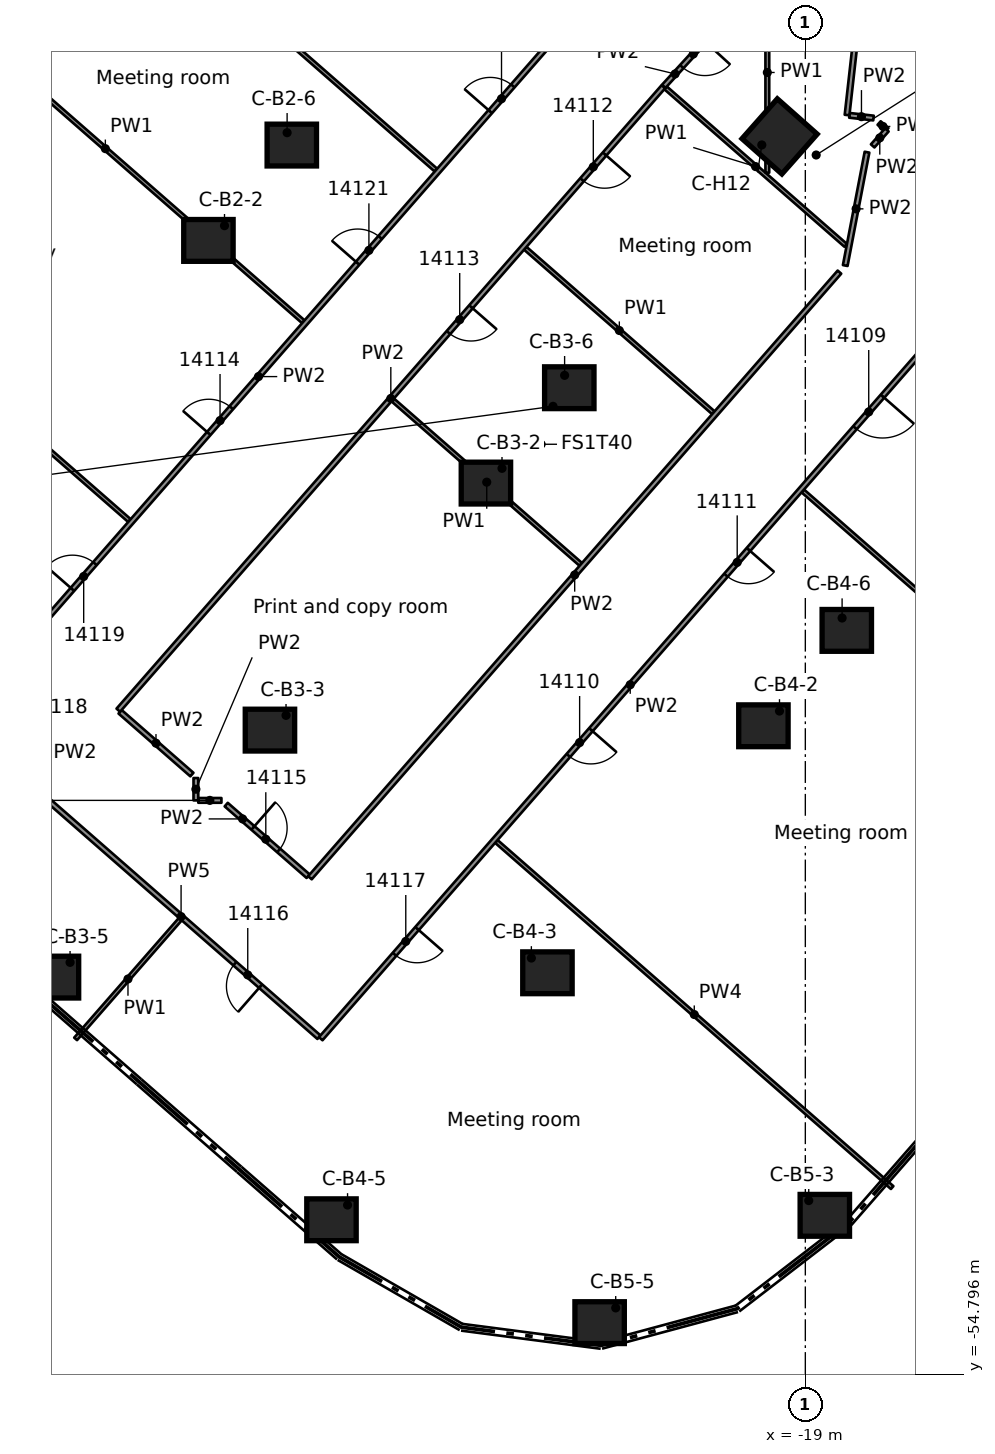
"""IFC4 building model, lengths in metres.
Left out: names, types, materials, properties, quantities, classifications, styles, units other than length and angle.
Written with IfcOpenShell. Run it as: python <this file> out.ifc"""

import sys

from ifc_helpers import new_model, si_unit, direction, frame, frame_2d, origin, origin_2d, place, context, subcontext, project, spatial, rectangle, extrude, element, fill, save


model = new_model("IFC4")
c1 = context("Model", 3, precision=1e-05, world=origin(), true_north=direction((0.0, 1.0)))
c2 = subcontext(c1, "Body", "Model", "MODEL_VIEW")
j1 = project(units=[si_unit("LENGTHUNIT", "METRE"), si_unit("PLANEANGLEUNIT", "RADIAN")], contexts=[c1])
p1 = place(None, origin())
s1 = spatial("IfcSite", under=j1, at=p1, CompositionType="ELEMENT")
p2 = place(p1, origin())
s2 = spatial("IfcBuilding", under=s1, at=p2, CompositionType="ELEMENT")
p3 = place(p2, frame((0.0, 0.0, 69.3)))
s3 = spatial("IfcBuildingStorey", under=s2, at=p3, CompositionType="ELEMENT", Elevation=69.3)
for number, where, z_axis, x_axis in (
    (1, (-34.707, -24.956, 0.0), (0.0, 0.0, 1.0), (1.0, 0.0, 0.0)),
    (2, (-32.513, -22.447, 0.0), (0.0, 0.0, 1.0), (1.0, 0.0, 0.0)),
    (3, (-27.405, -31.341, 0.0), (0.0, 0.0, 1.0), (1.0, 0.0, 0.0)),
    (4, (-33.088, -37.841, 0.0), (0.0, 0.0, 1.0), (1.0, 0.0, 0.0)),
    (5, (-38.771, -44.34, 0.0), (0.0, 0.0, 1.0), (1.0, 0.0, 0.0)),
    (6, (-25.211, -28.832, 0.0), (0.0, 0.0, 1.0), (1.0, 0.0, 0.0)),
    (7, (-20.103, -37.727, 0.0), (0.0, 0.0, 1.0), (1.0, 0.0, 0.0)),
    (8, (-25.786, -44.226, 0.0), (0.0, 0.0, 1.0), (1.0, 0.0, 0.0)),
    (9, (-31.469, -50.725, 0.0), (0.0, 0.0, 1.0), (1.0, 0.0, 0.0)),
    (10, (-17.909, -35.217, 0.0), (0.0, 0.0, 1.0), (1.0, 0.0, 0.0)),
    (11, (-18.487, -50.608, 0.0), (0.0, 0.0, 1.0), (1.0, 0.0, 0.0)),
    (12, (-24.413, -53.432, 0.0), (0.0, 0.0, 1.0), (1.0, 0.0, 0.0)),
):
    element("IfcColumn", number, at=place(p3, frame(where, z_axis=z_axis, x_axis=x_axis)), inside=s3, PredefinedType="COLUMN", context=c2, shape_type="SweptSolid", body=[
        extrude(rectangle(XDim=1.3, YDim=1.1, at=origin_2d()), origin(), (0.0, 0.0, 1.0), 3.5),
    ])
p4 = place(p3, frame((-19.677, -22.219, 0.0), z_axis=(0.0, 0.0, 1.0), x_axis=(-0.66298597789, -0.748631814126, 0.0)))
e13 = element("IfcColumn", 13, at=p4, inside=s3, PredefinedType="COLUMN", context=c2, shape_type="SweptSolid", body=[
    extrude(rectangle(XDim=1.4, YDim=1.4, at=origin_2d()), origin(), (0.0, 0.0, 1.0), 3.5),
])
p5 = place(p3, frame((-17.058, -21.867, 0.0), z_axis=(0.0, 0.0, 1.0), x_axis=(0.747902696109, -0.663808373819, 0.0)))
e14 = element("IfcWall", 14, at=p5, inside=s3, PredefinedType="PARTITIONING", context=c2, shape_type="SweptSolid", body=[
    extrude(rectangle(XDim=0.273, YDim=0.125, at=frame_2d((0.136, 0.0))), origin(), (0.0, 0.0, 1.0), 3.03),
])
p6 = place(p3, frame((-31.798, -45.921, 0.0), z_axis=(0.0, 0.0, 1.0), x_axis=(-0.752771196542, 0.658282253792, 0.0)))
e15 = element("IfcWall", 15, at=p6, inside=s3, PredefinedType="PARTITIONING", context=c2, shape_type="SweptSolid", body=[
    extrude(rectangle(XDim=9.64, YDim=0.125, at=frame_2d((4.82, 0.0))), origin(), (0.0, 0.0, 1.0), 2.419),
])
p7 = place(p6, frame((2.04, 0.0, 0.0)))
e16 = element("IfcOpeningElement", 16, at=p7, cuts=e15, PredefinedType="OPENING", context=c2, shape_type="SweptSolid", body=[
    extrude(rectangle(XDim=0.9, YDim=2.1, at=frame_2d((0.45, 1.05))), frame((0.0, 0.073, 0.0), z_axis=(0.0, -1.0, 0.0), x_axis=(1.0, 0.0, 0.0)), (0.0, 0.0, 1.0), 0.145),
])
p8 = place(p3, frame((-37.032, -37.358, 0.0), z_axis=(0.0, 0.0, 1.0), x_axis=(0.752691127314, -0.658373804812, 0.0)))
e17 = element("IfcWall", 17, at=p8, inside=s3, PredefinedType="PARTITIONING", context=c2, shape_type="SweptSolid", body=[
    extrude(rectangle(XDim=2.511, YDim=0.125, at=frame_2d((1.255, 0.0))), origin(), (0.0, 0.0, 1.0), 3.03),
])
p9 = place(p3, frame((-34.239, -39.801, 0.0), z_axis=(0.0, 0.0, 1.0), x_axis=(0.753004386547, -0.658015496657, 0.0)))
e18 = element("IfcWall", 18, at=p9, inside=s3, PredefinedType="PARTITIONING", context=c2, shape_type="SweptSolid", body=[
    extrude(rectangle(XDim=2.863, YDim=0.125, at=frame_2d((1.432, 0.0))), origin(), (0.0, 0.0, 1.0), 3.03),
])
p10 = place(p9, frame((0.934, 0.0, 0.0)))
e19 = element("IfcOpeningElement", 19, at=p10, cuts=e18, PredefinedType="OPENING", context=c2, shape_type="SweptSolid", body=[
    extrude(rectangle(XDim=0.9, YDim=2.1, at=frame_2d((0.45, 1.05))), frame((0.0, 0.073, 0.0), z_axis=(0.0, -1.0, 0.0), x_axis=(1.0, 0.0, 0.0)), (0.0, 0.0, 1.0), 0.145),
])
p11 = place(p3, frame((-47.202, -23.219, 0.0), z_axis=(0.0, 0.0, 1.0), x_axis=(0.752795260656, -0.658254734531, 0.0)))
e20 = element("IfcWall", 20, at=p11, inside=s3, PredefinedType="PARTITIONING", context=c2, shape_type="SweptSolid", body=[
    extrude(rectangle(XDim=13.836, YDim=0.1, at=frame_2d((6.918, 0.0))), origin(), (0.0, 0.0, 1.0), 3.03),
])
p12 = place(p3, frame((-27.13, -40.771, 0.0), z_axis=(0.0, 0.0, 1.0), x_axis=(0.752792007078, -0.65825845538, 0.0)))
e21 = element("IfcWall", 21, at=p12, inside=s3, PredefinedType="PARTITIONING", context=c2, shape_type="SweptSolid", body=[
    extrude(rectangle(XDim=13.835, YDim=0.1, at=frame_2d((6.917, 0.0))), origin(), (0.0, 0.0, 1.0), 2.419),
])
p13 = place(p3, frame((-42.628, -17.987, 0.0), z_axis=(0.0, 0.0, 1.0), x_axis=(0.752825840036, -0.65821976161, 0.0)))
e22 = element("IfcWall", 22, at=p13, inside=s3, PredefinedType="PARTITIONING", context=c2, shape_type="SweptSolid", body=[
    extrude(rectangle(XDim=13.837, YDim=0.1, at=frame_2d((6.918, 0.0))), origin(), (0.0, 0.0, 1.0), 3.03),
])
p14 = place(p3, frame((-29.858, -29.153, 0.0), z_axis=(0.0, 0.0, 1.0), x_axis=(0.752836606275, -0.658207447734, 0.0)))
e23 = element("IfcWall", 23, at=p14, inside=s3, PredefinedType="PARTITIONING", context=c2, shape_type="SweptSolid", body=[
    extrude(rectangle(XDim=6.574, YDim=0.1, at=frame_2d((3.287, 0.0))), origin(), (0.0, 0.0, 1.0), 3.03),
])
p15 = place(p3, frame((-39.139, -13.997, 0.0), z_axis=(0.0, 0.0, 1.0), x_axis=(0.752825840036, -0.65821976161, 0.0)))
e24 = element("IfcWall", 24, at=p15, inside=s3, PredefinedType="PARTITIONING", context=c2, shape_type="SweptSolid", body=[
    extrude(rectangle(XDim=13.837, YDim=0.1, at=frame_2d((6.918, 0.0))), origin(), (0.0, 0.0, 1.0), 3.03),
])
p16 = place(p3, frame((-26.369, -25.163, 0.0), z_axis=(0.0, 0.0, 1.0), x_axis=(0.752836606275, -0.658207447734, 0.0)))
e25 = element("IfcWall", 25, at=p16, inside=s3, PredefinedType="PARTITIONING", context=c2, shape_type="SweptSolid", body=[
    extrude(rectangle(XDim=6.574, YDim=0.1, at=frame_2d((3.287, 0.0))), origin(), (0.0, 0.0, 1.0), 3.03),
])
p17 = place(p3, frame((-19.067, -31.548, 0.0), z_axis=(0.0, 0.0, 1.0), x_axis=(0.752795260656, -0.658254734531, 0.0)))
e26 = element("IfcWall", 26, at=p17, inside=s3, PredefinedType="PARTITIONING", context=c2, shape_type="SweptSolid", body=[
    extrude(rectangle(XDim=13.836, YDim=0.1, at=frame_2d((6.918, 0.0))), origin(), (0.0, 0.0, 1.0), 3.03),
])
p18 = place(p3, frame((-22.678, -20.942, 0.0), z_axis=(0.0, 0.0, 1.0), x_axis=(0.752857732361, -0.658183283611, 0.0)))
e27 = element("IfcWall", 27, at=p18, inside=s3, PredefinedType="PARTITIONING", context=c2, shape_type="SweptSolid", body=[
    extrude(rectangle(XDim=6.295, YDim=0.1, at=frame_2d((3.147, 0.0))), origin(), (0.0, 0.0, 1.0), 3.03),
])
p19 = place(p3, frame((-17.84, -21.665, 0.0), z_axis=(0.0, 0.0, 1.0), x_axis=(0.993780638981, -0.111355473987, 0.0)))
e28 = element("IfcWall", 28, at=p19, inside=s3, PredefinedType="PARTITIONING", context=c2, shape_type="SweptSolid", body=[
    extrude(rectangle(XDim=0.638, YDim=0.125, at=frame_2d((0.319, 0.0))), origin(), (0.0, 0.0, 1.0), 3.03),
])
p20 = place(p3, frame((-34.974, -39.69, 0.0), z_axis=(0.0, 0.0, 1.0), x_axis=(1.0, 0.0, 0.0)))
e29 = element("IfcWall", 29, at=p20, inside=s3, PredefinedType="PARTITIONING", context=c2, shape_type="SweptSolid", body=[
    extrude(rectangle(XDim=0.609, YDim=0.125, at=frame_2d((0.305, 0.0))), origin(), (0.0, 0.0, 1.0), 2.419),
])
p21 = place(p3, frame((-21.239, -19.276, 0.0), z_axis=(0.0, 0.0, 1.0), x_axis=(-0.67486064048, -0.737945198461, 0.0)))
e30 = element("IfcWall", 30, at=p21, inside=s3, PredefinedType="PARTITIONING", context=c2, shape_type="SweptSolid", body=[
    extrude(rectangle(XDim=2.202, YDim=0.125, at=frame_2d((1.101, 0.0))), origin(), (0.0, 0.0, 1.0), 3.03),
])
p22 = place(p21, frame((0.6, 0.0, 0.0)))
e31 = element("IfcOpeningElement", 31, at=p22, cuts=e30, PredefinedType="OPENING", context=c2, shape_type="SweptSolid", body=[
    extrude(rectangle(XDim=0.9, YDim=2.1, at=frame_2d((0.45, 1.05))), frame((0.0, 0.073, 0.0), z_axis=(0.0, -1.0, 0.0), x_axis=(1.0, 0.0, 0.0)), (0.0, 0.0, 1.0), 0.145),
])
p23 = place(p3, frame((-17.228, -22.469, 0.0), z_axis=(0.0, 0.0, 1.0), x_axis=(0.664256182607, 0.747504999226, 0.0)))
e32 = element("IfcWall", 32, at=p23, inside=s3, PredefinedType="PARTITIONING", context=c2, shape_type="SweptSolid", body=[
    extrude(rectangle(XDim=0.563, YDim=0.125, at=frame_2d((0.281, 0.0))), origin(), (0.0, 0.0, 1.0), 3.03),
])
p24 = place(p3, frame((-15.464, -27.333, 0.0), z_axis=(0.0, 0.0, 1.0), x_axis=(-0.658239133646, -0.752808902004, 0.0)))
e33 = element("IfcWall", 33, at=p24, inside=s3, PredefinedType="PARTITIONING", context=c2, shape_type="SweptSolid", body=[
    extrude(rectangle(XDim=24.745, YDim=0.125, at=frame_2d((12.372, 0.0))), origin(), (0.0, 0.0, 1.0), 3.03),
])
p25 = place(p24, frame((2.288, 0.0, 0.0)))
e34 = element("IfcOpeningElement", 34, at=p25, cuts=e33, PredefinedType="OPENING", context=c2, shape_type="SweptSolid", body=[
    extrude(rectangle(XDim=1.1, YDim=2.1, at=frame_2d((0.55, 1.05))), frame((0.0, 0.073, 0.0), z_axis=(0.0, -1.0, 0.0), x_axis=(1.0, 0.0, 0.0)), (0.0, 0.0, 1.0), 0.145),
])
p26 = place(p24, frame((13.944, 0.0, 0.0)))
e35 = element("IfcOpeningElement", 35, at=p26, cuts=e33, PredefinedType="OPENING", context=c2, shape_type="SweptSolid", body=[
    extrude(rectangle(XDim=0.9, YDim=2.1, at=frame_2d((0.45, 1.05))), frame((0.0, 0.073, 0.0), z_axis=(0.0, -1.0, 0.0), x_axis=(1.0, 0.0, 0.0)), (0.0, 0.0, 1.0), 0.145),
])
p27 = place(p24, frame((7.646, 0.0, 0.0)))
e36 = element("IfcOpeningElement", 36, at=p27, cuts=e33, PredefinedType="OPENING", context=c2, shape_type="SweptSolid", body=[
    extrude(rectangle(XDim=0.9, YDim=2.1, at=frame_2d((0.45, 1.05))), frame((0.0, 0.073, 0.0), z_axis=(0.0, -1.0, 0.0), x_axis=(1.0, 0.0, 0.0)), (0.0, 0.0, 1.0), 0.145),
])
p28 = place(p24, frame((20.895, 0.0, 0.0)))
e37 = element("IfcOpeningElement", 37, at=p28, cuts=e33, PredefinedType="OPENING", context=c2, shape_type="SweptSolid", body=[
    extrude(rectangle(XDim=0.9, YDim=2.1, at=frame_2d((0.45, 1.05))), frame((0.0, 0.073, 0.0), z_axis=(0.0, -1.0, 0.0), x_axis=(1.0, 0.0, 0.0)), (0.0, 0.0, 1.0), 0.145),
])
p29 = place(p3, frame((-32.036, -41.726, 0.0), z_axis=(0.0, 0.0, 1.0), x_axis=(0.658231851406, 0.752815269369, 0.0)))
e38 = element("IfcWall", 38, at=p29, inside=s3, PredefinedType="PARTITIONING", context=c2, shape_type="SweptSolid", body=[
    extrude(rectangle(XDim=21.169, YDim=0.125, at=frame_2d((10.584, 0.0))), origin(), (0.0, 0.0, 1.0), 3.03),
])
p30 = place(p3, frame((-38.202, -45.966, 0.0), z_axis=(0.0, 0.0, 1.0), x_axis=(0.658203200775, 0.752840319384, 0.0)))
e39 = element("IfcWall", 39, at=p30, inside=s3, PredefinedType="PARTITIONING", context=c2, shape_type="SweptSolid", body=[
    extrude(rectangle(XDim=4.187, YDim=0.1, at=frame_2d((2.094, 0.0))), origin(), (0.0, 0.0, 1.0), 3.03),
])
p31 = place(p3, frame((-22.736, -20.913, 0.0), z_axis=(0.0, 0.0, 1.0), x_axis=(-0.658236458127, -0.752811241409, 0.0)))
e40 = element("IfcWall", 40, at=p31, inside=s3, PredefinedType="PARTITIONING", context=c2, shape_type="SweptSolid", body=[
    extrude(rectangle(XDim=21.79, YDim=0.125, at=frame_2d((10.895, 0.0))), origin(), (0.0, 0.0, 1.0), 3.03),
])
p32 = place(p31, frame((2.35, 0.0, 0.0)))
e41 = element("IfcOpeningElement", 41, at=p32, cuts=e40, PredefinedType="OPENING", context=c2, shape_type="SweptSolid", body=[
    extrude(rectangle(XDim=0.9, YDim=2.1, at=frame_2d((0.45, 1.05))), frame((0.0, 0.073, 0.0), z_axis=(0.0, -1.0, 0.0), x_axis=(1.0, 0.0, 0.0)), (0.0, 0.0, 1.0), 0.145),
])
p33 = place(p31, frame((7.691, 0.0, 0.0)))
e42 = element("IfcOpeningElement", 42, at=p33, cuts=e40, PredefinedType="OPENING", context=c2, shape_type="SweptSolid", body=[
    extrude(rectangle(XDim=0.9, YDim=2.1, at=frame_2d((0.45, 1.05))), frame((0.0, 0.073, 0.0), z_axis=(0.0, -1.0, 0.0), x_axis=(1.0, 0.0, 0.0)), (0.0, 0.0, 1.0), 0.145),
])
p34 = place(p3, frame((-41.314, -37.6, 0.0), z_axis=(0.0, 0.0, 1.0), x_axis=(0.658340906106, 0.752719902319, 0.0)))
e43 = element("IfcWall", 43, at=p34, inside=s3, PredefinedType="PARTITIONING", context=c2, shape_type="SweptSolid", body=[
    extrude(rectangle(XDim=24.075, YDim=0.125, at=frame_2d((12.038, 0.0))), origin(), (0.0, 0.0, 1.0), 3.03),
])
p35 = place(p34, frame((10.05, 0.0, 0.0)))
e44 = element("IfcOpeningElement", 44, at=p35, cuts=e43, PredefinedType="OPENING", context=c2, shape_type="SweptSolid", body=[
    extrude(rectangle(XDim=0.9, YDim=2.1, at=frame_2d((0.45, 1.05))), frame((0.0, 0.073, 0.0), z_axis=(0.0, -1.0, 0.0), x_axis=(1.0, 0.0, 0.0)), (0.0, 0.0, 1.0), 0.145),
])
p36 = place(p34, frame((4.6, 0.0, 0.0)))
e45 = element("IfcOpeningElement", 45, at=p36, cuts=e43, PredefinedType="OPENING", context=c2, shape_type="SweptSolid", body=[
    extrude(rectangle(XDim=0.9, YDim=2.1, at=frame_2d((0.45, 1.05))), frame((0.0, 0.073, 0.0), z_axis=(0.0, -1.0, 0.0), x_axis=(1.0, 0.0, 0.0)), (0.0, 0.0, 1.0), 0.145),
])
p37 = place(p34, frame((21.301, 0.0, 0.0)))
e46 = element("IfcOpeningElement", 46, at=p37, cuts=e43, PredefinedType="OPENING", context=c2, shape_type="SweptSolid", body=[
    extrude(rectangle(XDim=0.9, YDim=2.1, at=frame_2d((0.45, 1.05))), frame((0.0, 0.073, 0.0), z_axis=(0.0, -1.0, 0.0), x_axis=(1.0, 0.0, 0.0)), (0.0, 0.0, 1.0), 0.145),
])
p38 = place(p34, frame((16.0, 0.0, 0.0)))
e47 = element("IfcOpeningElement", 47, at=p38, cuts=e43, PredefinedType="OPENING", context=c2, shape_type="SweptSolid", body=[
    extrude(rectangle(XDim=0.9, YDim=2.1, at=frame_2d((0.45, 1.05))), frame((0.0, 0.073, 0.0), z_axis=(0.0, -1.0, 0.0), x_axis=(1.0, 0.0, 0.0)), (0.0, 0.0, 1.0), 0.145),
])
p39 = place(p3, frame((-17.95, -25.617, 0.0), z_axis=(0.0, 0.0, 1.0), x_axis=(0.188644670049, 0.982045410591, 0.0)))
e48 = element("IfcWall", 48, at=p39, inside=s3, PredefinedType="PARTITIONING", context=c2, shape_type="SweptSolid", body=[
    extrude(rectangle(XDim=3.037, YDim=0.125, at=frame_2d((1.519, 0.0))), origin(), (0.0, 0.0, 1.0), 3.03),
])
p40 = place(p3, frame((-17.902, -21.657, 0.0), z_axis=(0.0, 0.0, 1.0), x_axis=(0.111672630046, 0.993745049647, 0.0)))
e49 = element("IfcWall", 49, at=p40, inside=s3, PredefinedType="PARTITIONING", context=c2, shape_type="SweptSolid", body=[
    extrude(rectangle(XDim=6.045, YDim=0.125, at=frame_2d((3.022, 0.0))), origin(), (0.0, 0.0, 1.0), 3.03),
])
p41 = place(p3, frame((-20.0, -23.174, 0.0), z_axis=(0.0, 0.0, 1.0), x_axis=(0.0, 1.0, 0.0)))
e50 = element("IfcWall", 50, at=p41, inside=s3, PredefinedType="PARTITIONING", context=c2, shape_type="SweptSolid", body=[
    extrude(rectangle(XDim=5.274, YDim=0.1, at=frame_2d((2.637, 0.0))), origin(), (0.0, 0.0, 1.0), 3.03),
])
p42 = place(p3, frame((-35.037, -39.69, 0.0), z_axis=(0.0, 0.0, 1.0), x_axis=(0.0, 1.0, 0.0)))
e51 = element("IfcWall", 51, at=p42, inside=s3, PredefinedType="PARTITIONING", context=c2, shape_type="SweptSolid", body=[
    extrude(rectangle(XDim=0.588, YDim=0.125, at=frame_2d((0.294, 0.0))), origin(), (0.0, 0.0, 1.0), 3.03),
])
p43 = place(p25, origin())
e52 = element("IfcDoor", 52, at=p43, inside=s3, OperationType="SINGLE_SWING_LEFT", PredefinedType="DOOR", context=c2, shape_type="SweptSolid", body=[
    extrude(rectangle(XDim=1.1, YDim=2.1, at=frame_2d((0.55, 1.05))), frame((0.0, 0.025, 0.0), z_axis=(0.0, -1.0, 0.0), x_axis=(1.0, 0.0, 0.0)), (0.0, 0.0, 1.0), 0.05),
])
fill(e34, e52)
p44 = place(p26, origin())
e53 = element("IfcDoor", 53, at=p44, inside=s3, OperationType="SINGLE_SWING_RIGHT", PredefinedType="DOOR", context=c2, shape_type="SweptSolid", body=[
    extrude(rectangle(XDim=0.9, YDim=2.1, at=frame_2d((0.45, 1.05))), frame((0.0, 0.025, 0.0), z_axis=(0.0, -1.0, 0.0), x_axis=(1.0, 0.0, 0.0)), (0.0, 0.0, 1.0), 0.05),
])
fill(e35, e53)
p45 = place(p27, origin())
e54 = element("IfcDoor", 54, at=p45, inside=s3, OperationType="SINGLE_SWING_LEFT", PredefinedType="DOOR", context=c2, shape_type="SweptSolid", body=[
    extrude(rectangle(XDim=0.9, YDim=2.1, at=frame_2d((0.45, 1.05))), frame((0.0, 0.025, 0.0), z_axis=(0.0, -1.0, 0.0), x_axis=(1.0, 0.0, 0.0)), (0.0, 0.0, 1.0), 0.05),
])
fill(e36, e54)
p46 = place(p32, origin())
e55 = element("IfcDoor", 55, at=p46, inside=s3, OperationType="SINGLE_SWING_LEFT", PredefinedType="DOOR", context=c2, shape_type="SweptSolid", body=[
    extrude(rectangle(XDim=0.9, YDim=2.1, at=frame_2d((0.45, 1.05))), frame((0.0, 0.025, 0.0), z_axis=(0.0, -1.0, 0.0), x_axis=(1.0, 0.0, 0.0)), (0.0, 0.0, 1.0), 0.05),
])
fill(e41, e55)
p47 = place(p33, origin())
e56 = element("IfcDoor", 56, at=p47, inside=s3, OperationType="SINGLE_SWING_LEFT", PredefinedType="DOOR", context=c2, shape_type="SweptSolid", body=[
    extrude(rectangle(XDim=0.9, YDim=2.1, at=frame_2d((0.45, 1.05))), frame((0.0, 0.025, 0.0), z_axis=(0.0, -1.0, 0.0), x_axis=(1.0, 0.0, 0.0)), (0.0, 0.0, 1.0), 0.05),
])
fill(e42, e56)
p48 = place(p35, origin())
e57 = element("IfcDoor", 57, at=p48, inside=s3, OperationType="SINGLE_SWING_LEFT", PredefinedType="DOOR", context=c2, shape_type="SweptSolid", body=[
    extrude(rectangle(XDim=0.9, YDim=2.1, at=frame_2d((0.45, 1.05))), frame((0.0, 0.025, 0.0), z_axis=(0.0, -1.0, 0.0), x_axis=(1.0, 0.0, 0.0)), (0.0, 0.0, 1.0), 0.05),
])
fill(e44, e57)
p49 = place(p10, origin())
e58 = element("IfcDoor", 58, at=p49, inside=s3, OperationType="SINGLE_SWING_LEFT", PredefinedType="DOOR", context=c2, shape_type="SweptSolid", body=[
    extrude(rectangle(XDim=0.9, YDim=2.1, at=frame_2d((0.45, 1.05))), frame((0.0, 0.025, 0.0), z_axis=(0.0, -1.0, 0.0), x_axis=(1.0, 0.0, 0.0)), (0.0, 0.0, 1.0), 0.05),
])
fill(e19, e58)
p50 = place(p7, origin())
e59 = element("IfcDoor", 59, at=p50, inside=s3, OperationType="SINGLE_SWING_LEFT", PredefinedType="DOOR", context=c2, shape_type="SweptSolid", body=[
    extrude(rectangle(XDim=0.9, YDim=2.1, at=frame_2d((0.45, 1.05))), frame((0.0, 0.025, 0.0), z_axis=(0.0, -1.0, 0.0), x_axis=(1.0, 0.0, 0.0)), (0.0, 0.0, 1.0), 0.05),
])
fill(e16, e59)
p51 = place(p28, origin())
e60 = element("IfcDoor", 60, at=p51, inside=s3, OperationType="SINGLE_SWING_RIGHT", PredefinedType="DOOR", context=c2, shape_type="SweptSolid", body=[
    extrude(rectangle(XDim=0.9, YDim=2.1, at=frame_2d((0.45, 1.05))), frame((0.0, 0.025, 0.0), z_axis=(0.0, -1.0, 0.0), x_axis=(1.0, 0.0, 0.0)), (0.0, 0.0, 1.0), 0.05),
])
fill(e37, e60)
p52 = place(p36, origin())
e61 = element("IfcDoor", 61, at=p52, inside=s3, OperationType="SINGLE_SWING_LEFT", PredefinedType="DOOR", context=c2, shape_type="SweptSolid", body=[
    extrude(rectangle(XDim=0.9, YDim=2.1, at=frame_2d((0.45, 1.05))), frame((0.0, 0.025, 0.0), z_axis=(0.0, -1.0, 0.0), x_axis=(1.0, 0.0, 0.0)), (0.0, 0.0, 1.0), 0.05),
])
fill(e45, e61)
p53 = place(p37, origin())
e62 = element("IfcDoor", 62, at=p53, inside=s3, OperationType="SINGLE_SWING_RIGHT", PredefinedType="DOOR", context=c2, shape_type="SweptSolid", body=[
    extrude(rectangle(XDim=0.9, YDim=2.1, at=frame_2d((0.45, 1.05))), frame((0.0, 0.025, 0.0), z_axis=(0.0, -1.0, 0.0), x_axis=(1.0, 0.0, 0.0)), (0.0, 0.0, 1.0), 0.05),
])
fill(e46, e62)
p54 = place(p38, origin())
e63 = element("IfcDoor", 63, at=p54, inside=s3, OperationType="SINGLE_SWING_RIGHT", PredefinedType="DOOR", context=c2, shape_type="SweptSolid", body=[
    extrude(rectangle(XDim=0.9, YDim=2.1, at=frame_2d((0.45, 1.05))), frame((0.0, 0.025, 0.0), z_axis=(0.0, -1.0, 0.0), x_axis=(1.0, 0.0, 0.0)), (0.0, 0.0, 1.0), 0.05),
])
fill(e47, e63)
p55 = place(p22, origin())
e64 = element("IfcDoor", 64, at=p55, inside=s3, OperationType="SINGLE_SWING_LEFT", PredefinedType="DOOR", context=c2, shape_type="SweptSolid", body=[
    extrude(rectangle(XDim=0.9, YDim=2.1, at=frame_2d((0.45, 1.05))), frame((0.0, 0.025, 0.0), z_axis=(0.0, -1.0, 0.0), x_axis=(1.0, 0.0, 0.0)), (0.0, 0.0, 1.0), 0.05),
])
fill(e31, e64)
save(model, sys.argv[1])
